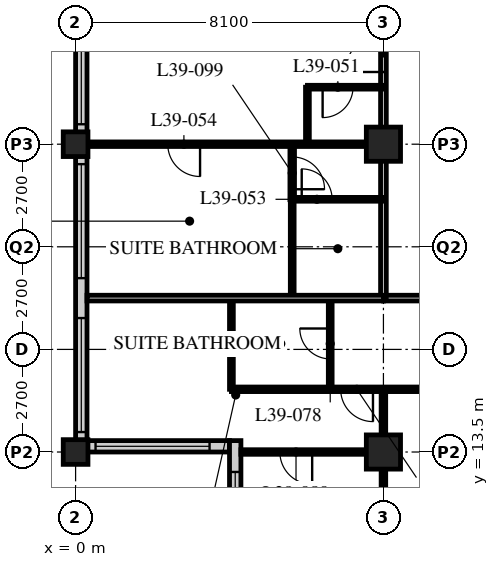
"""IFC4 building model, lengths in metres.
Left out: names, types, materials, properties, quantities, classifications, styles, units other than length and angle.
Written with IfcOpenShell. Run it as: python <this file> out.ifc"""

import sys

from ifc_helpers import new_model, si_unit, direction, frame, frame_2d, origin, origin_2d, place, context, subcontext, project, spatial, rectangle, hollow_rectangle, extrude, element, fill, save


model = new_model("IFC4")
c1 = context("Model", 3, precision=1e-05, world=origin(), true_north=direction((0.0, 1.0)))
c2 = subcontext(c1, "Body", "Model", "MODEL_VIEW")
j1 = project(units=[si_unit("LENGTHUNIT", "METRE"), si_unit("PLANEANGLEUNIT", "RADIAN")], contexts=[c1])
p1 = place(None, origin())
s1 = spatial("IfcSite", under=j1, at=p1, CompositionType="ELEMENT")
p2 = place(p1, origin())
s2 = spatial("IfcBuilding", under=s1, at=p2, CompositionType="ELEMENT")
p3 = place(p2, frame((0.0, 0.0, 151.0)))
s3 = spatial("IfcBuildingStorey", under=s2, at=p3, CompositionType="ELEMENT", Elevation=151.0)
for number, where, z_axis, x_axis in (
    (1, (0.0, 13.5, 0.0), (0.0, 0.0, 1.0), (1.0, 0.0, 0.0)),
    (2, (0.0, 21.6, 0.0), (0.0, 0.0, 1.0), (1.0, 0.0, 0.0)),
):
    element("IfcColumn", number, at=place(p3, frame(where, z_axis=z_axis, x_axis=x_axis)), inside=s3, PredefinedType="COLUMN", context=c2, shape_type="SweptSolid", body=[
        extrude(hollow_rectangle(XDim=0.65, YDim=0.65, WallThickness=0.055, at=origin_2d()), origin(), (0.0, 0.0, 1.0), 3.4),
    ])
for number, where, z_axis, x_axis in (
    (3, (8.1, 13.5, 0.0), (0.0, 0.0, 1.0), (1.0, 0.0, 0.0)),
    (4, (8.1, 21.6, 0.0), (0.0, 0.0, 1.0), (1.0, 0.0, 0.0)),
):
    element("IfcColumn", number, at=place(p3, frame(where, z_axis=z_axis, x_axis=x_axis)), inside=s3, PredefinedType="COLUMN", context=c2, shape_type="SweptSolid", body=[
        extrude(hollow_rectangle(XDim=0.9, YDim=0.9, WallThickness=0.1, at=origin_2d()), origin(), (0.0, 0.0, 1.0), 3.4),
    ])
p4 = place(p3, frame((0.15, 45.6, 0.0), z_axis=(0.0, 0.0, 1.0), x_axis=(0.0, -1.0, 0.0)))
e5 = element("IfcWall", 5, at=p4, inside=s3, PredefinedType="SOLIDWALL", context=c2, shape_type="SweptSolid", body=[
    extrude(rectangle(XDim=32.1, YDim=0.3, at=frame_2d((16.05, 0.0))), origin(), (0.0, 0.0, 1.0), 3.19),
])
p5 = place(p4, frame((0.225, 0.0, 0.9)))
e6 = element("IfcOpeningElement", 6, at=p5, cuts=e5, PredefinedType="OPENING", context=c2, shape_type="SweptSolid", body=[
    extrude(rectangle(XDim=3.0, YDim=1.4, at=frame_2d((1.5, 0.7))), frame((0.0, 0.16, 0.0), z_axis=(0.0, -1.0, 0.0), x_axis=(1.0, 0.0, 0.0)), (0.0, 0.0, 1.0), 0.32),
])
p6 = place(p4, frame((4.275, 0.0, 0.9)))
e7 = element("IfcOpeningElement", 7, at=p6, cuts=e5, PredefinedType="OPENING", context=c2, shape_type="SweptSolid", body=[
    extrude(rectangle(XDim=3.0, YDim=1.4, at=frame_2d((1.5, 0.7))), frame((0.0, 0.16, 0.0), z_axis=(0.0, -1.0, 0.0), x_axis=(1.0, 0.0, 0.0)), (0.0, 0.0, 1.0), 0.32),
])
p7 = place(p4, frame((8.325, 0.0, 0.9)))
e8 = element("IfcOpeningElement", 8, at=p7, cuts=e5, PredefinedType="OPENING", context=c2, shape_type="SweptSolid", body=[
    extrude(rectangle(XDim=3.0, YDim=1.4, at=frame_2d((1.5, 0.7))), frame((0.0, 0.16, 0.0), z_axis=(0.0, -1.0, 0.0), x_axis=(1.0, 0.0, 0.0)), (0.0, 0.0, 1.0), 0.32),
])
p8 = place(p4, frame((12.375, 0.0, 0.9)))
e9 = element("IfcOpeningElement", 9, at=p8, cuts=e5, PredefinedType="OPENING", context=c2, shape_type="SweptSolid", body=[
    extrude(rectangle(XDim=3.0, YDim=1.4, at=frame_2d((1.5, 0.7))), frame((0.0, 0.16, 0.0), z_axis=(0.0, -1.0, 0.0), x_axis=(1.0, 0.0, 0.0)), (0.0, 0.0, 1.0), 0.32),
])
p9 = place(p4, frame((16.425, 0.0, 0.9)))
e10 = element("IfcOpeningElement", 10, at=p9, cuts=e5, PredefinedType="OPENING", context=c2, shape_type="SweptSolid", body=[
    extrude(rectangle(XDim=3.0, YDim=1.4, at=frame_2d((1.5, 0.7))), frame((0.0, 0.16, 0.0), z_axis=(0.0, -1.0, 0.0), x_axis=(1.0, 0.0, 0.0)), (0.0, 0.0, 1.0), 0.32),
])
p10 = place(p4, frame((20.475, 0.0, 0.9)))
e11 = element("IfcOpeningElement", 11, at=p10, cuts=e5, PredefinedType="OPENING", context=c2, shape_type="SweptSolid", body=[
    extrude(rectangle(XDim=3.0, YDim=1.4, at=frame_2d((1.5, 0.7))), frame((0.0, 0.16, 0.0), z_axis=(0.0, -1.0, 0.0), x_axis=(1.0, 0.0, 0.0)), (0.0, 0.0, 1.0), 0.32),
])
p11 = place(p4, frame((24.525, 0.0, 0.9)))
e12 = element("IfcOpeningElement", 12, at=p11, cuts=e5, PredefinedType="OPENING", context=c2, shape_type="SweptSolid", body=[
    extrude(rectangle(XDim=3.0, YDim=1.4, at=frame_2d((1.5, 0.7))), frame((0.0, 0.16, 0.0), z_axis=(0.0, -1.0, 0.0), x_axis=(1.0, 0.0, 0.0)), (0.0, 0.0, 1.0), 0.32),
])
p12 = place(p4, frame((28.575, 0.0, 0.9)))
e13 = element("IfcOpeningElement", 13, at=p12, cuts=e5, PredefinedType="OPENING", context=c2, shape_type="SweptSolid", body=[
    extrude(rectangle(XDim=3.0, YDim=1.4, at=frame_2d((1.5, 0.7))), frame((0.0, 0.16, 0.0), z_axis=(0.0, -1.0, 0.0), x_axis=(1.0, 0.0, 0.0)), (0.0, 0.0, 1.0), 0.32),
])
p13 = place(p3, frame((0.3, 13.65, 0.0), z_axis=(0.0, 0.0, 1.0), x_axis=(1.0, 0.0, 0.0)))
e14 = element("IfcWall", 14, at=p13, inside=s3, PredefinedType="SOLIDWALL", context=c2, shape_type="SweptSolid", body=[
    extrude(rectangle(XDim=3.75, YDim=0.3, at=frame_2d((1.875, 0.0))), origin(), (0.0, 0.0, 1.0), 3.19),
])
p14 = place(p13, frame((0.225, 0.0, 0.9)))
e15 = element("IfcOpeningElement", 15, at=p14, cuts=e14, PredefinedType="OPENING", context=c2, shape_type="SweptSolid", body=[
    extrude(rectangle(XDim=3.0, YDim=1.4, at=frame_2d((1.5, 0.7))), frame((0.0, 0.16, 0.0), z_axis=(0.0, -1.0, 0.0), x_axis=(1.0, 0.0, 0.0)), (0.0, 0.0, 1.0), 0.32),
])
p15 = place(p3, frame((4.2, 13.8, 0.0), z_axis=(0.0, 0.0, 1.0), x_axis=(0.0, -1.0, 0.0)))
e16 = element("IfcWall", 16, at=p15, inside=s3, PredefinedType="SOLIDWALL", context=c2, shape_type="SweptSolid", body=[
    extrude(rectangle(XDim=4.35, YDim=0.3, at=frame_2d((2.175, 0.0))), origin(), (0.0, 0.0, 1.0), 3.19),
])
p16 = place(p15, frame((0.825, 0.0, 0.9)))
e17 = element("IfcOpeningElement", 17, at=p16, cuts=e16, PredefinedType="OPENING", context=c2, shape_type="SweptSolid", body=[
    extrude(rectangle(XDim=3.0, YDim=1.4, at=frame_2d((1.5, 0.7))), frame((0.0, 0.16, 0.0), z_axis=(0.0, -1.0, 0.0), x_axis=(1.0, 0.0, 0.0)), (0.0, 0.0, 1.0), 0.32),
])
p17 = place(p3, frame((8.1, 17.55, 0.0), z_axis=(0.0, 0.0, 1.0), x_axis=(1.0, 0.0, 0.0)))
e18 = element("IfcWall", 18, at=p17, inside=s3, PredefinedType="PARTITIONING", context=c2, shape_type="SweptSolid", body=[
    extrude(rectangle(XDim=40.5, YDim=0.15, at=frame_2d((20.25, 0.0))), origin(), (0.0, 0.0, 1.0), 3.19),
])
p18 = place(p17, frame((10.0, 0.0, 0.0)))
e19 = element("IfcOpeningElement", 19, at=p18, cuts=e18, PredefinedType="OPENING", context=c2, shape_type="SweptSolid", body=[
    extrude(rectangle(XDim=1.0, YDim=2.1, at=frame_2d((0.5, 1.05))), frame((0.0, 0.085, 0.0), z_axis=(0.0, -1.0, 0.0), x_axis=(1.0, 0.0, 0.0)), (0.0, 0.0, 1.0), 0.17),
])
p19 = place(p17, frame((22.15, 0.0, 0.0)))
e20 = element("IfcOpeningElement", 20, at=p19, cuts=e18, PredefinedType="OPENING", context=c2, shape_type="SweptSolid", body=[
    extrude(rectangle(XDim=1.0, YDim=2.1, at=frame_2d((0.5, 1.05))), frame((0.0, 0.085, 0.0), z_axis=(0.0, -1.0, 0.0), x_axis=(1.0, 0.0, 0.0)), (0.0, 0.0, 1.0), 0.17),
])
p20 = place(p17, frame((30.8, 0.0, 0.0)))
e21 = element("IfcOpeningElement", 21, at=p20, cuts=e18, PredefinedType="OPENING", context=c2, shape_type="SweptSolid", body=[
    extrude(rectangle(XDim=1.0, YDim=2.1, at=frame_2d((0.5, 1.05))), frame((0.0, 0.085, 0.0), z_axis=(0.0, -1.0, 0.0), x_axis=(1.0, 0.0, 0.0)), (0.0, 0.0, 1.0), 0.17),
])
p21 = place(p17, frame((34.85, 0.0, 0.0)))
e22 = element("IfcOpeningElement", 22, at=p21, cuts=e18, PredefinedType="OPENING", context=c2, shape_type="SweptSolid", body=[
    extrude(rectangle(XDim=1.0, YDim=2.1, at=frame_2d((0.5, 1.05))), frame((0.0, 0.085, 0.0), z_axis=(0.0, -1.0, 0.0), x_axis=(1.0, 0.0, 0.0)), (0.0, 0.0, 1.0), 0.17),
])
p22 = place(p17, frame((1.525, 0.0, 0.0)))
e23 = element("IfcOpeningElement", 23, at=p22, cuts=e18, PredefinedType="OPENING", context=c2, shape_type="SweptSolid", body=[
    extrude(rectangle(XDim=1.0, YDim=2.1, at=frame_2d((0.5, 1.05))), frame((0.0, 0.085, 0.0), z_axis=(0.0, -1.0, 0.0), x_axis=(1.0, 0.0, 0.0)), (0.0, 0.0, 1.0), 0.17),
])
p23 = place(p17, frame((37.975, 0.0, 0.0)))
e24 = element("IfcOpeningElement", 24, at=p23, cuts=e18, PredefinedType="OPENING", context=c2, shape_type="SweptSolid", body=[
    extrude(rectangle(XDim=1.0, YDim=2.1, at=frame_2d((0.5, 1.05))), frame((0.0, 0.085, 0.0), z_axis=(0.0, -1.0, 0.0), x_axis=(1.0, 0.0, 0.0)), (0.0, 0.0, 1.0), 0.17),
])
p24 = place(p3, frame((8.1, 17.55, 0.0), z_axis=(0.0, 0.0, 1.0), x_axis=(0.0, 1.0, 0.0)))
e25 = element("IfcWall", 25, at=p24, inside=s3, PredefinedType="PARTITIONING", context=c2, shape_type="SweptSolid", body=[
    extrude(rectangle(XDim=28.35, YDim=0.15, at=frame_2d((14.175, 0.0))), origin(), (0.0, 0.0, 1.0), 2.42),
])
p25 = place(p24, frame((5.95, 0.0, 0.0)))
e26 = element("IfcOpeningElement", 26, at=p25, cuts=e25, PredefinedType="OPENING", context=c2, shape_type="SweptSolid", body=[
    extrude(rectangle(XDim=1.0, YDim=2.1, at=frame_2d((0.5, 1.05))), frame((0.0, 0.085, 0.0), z_axis=(0.0, -1.0, 0.0), x_axis=(1.0, 0.0, 0.0)), (0.0, 0.0, 1.0), 0.17),
])
p26 = place(p24, frame((16.8, 0.0, 0.0)))
e27 = element("IfcOpeningElement", 27, at=p26, cuts=e25, PredefinedType="OPENING", context=c2, shape_type="SweptSolid", body=[
    extrude(rectangle(XDim=1.0, YDim=2.1, at=frame_2d((0.5, 1.05))), frame((0.0, 0.085, 0.0), z_axis=(0.0, -1.0, 0.0), x_axis=(1.0, 0.0, 0.0)), (0.0, 0.0, 1.0), 0.17),
])
p27 = place(p24, frame((22.7, 0.0, 0.0)))
e28 = element("IfcOpeningElement", 28, at=p27, cuts=e25, PredefinedType="OPENING", context=c2, shape_type="SweptSolid", body=[
    extrude(rectangle(XDim=1.0, YDim=2.1, at=frame_2d((0.5, 1.05))), frame((0.0, 0.085, 0.0), z_axis=(0.0, -1.0, 0.0), x_axis=(1.0, 0.0, 0.0)), (0.0, 0.0, 1.0), 0.17),
])
p28 = place(p24, frame((24.9, 0.0, 0.0)))
e29 = element("IfcOpeningElement", 29, at=p28, cuts=e25, PredefinedType="OPENING", context=c2, shape_type="SweptSolid", body=[
    extrude(rectangle(XDim=1.0, YDim=2.1, at=frame_2d((0.5, 1.05))), frame((0.0, 0.085, 0.0), z_axis=(0.0, -1.0, 0.0), x_axis=(1.0, 0.0, 0.0)), (0.0, 0.0, 1.0), 0.17),
])
p29 = place(p3, frame((6.1, 21.6, 0.0), z_axis=(0.0, 0.0, 1.0), x_axis=(0.0, 1.0, 0.0)))
e30 = element("IfcWall", 30, at=p29, inside=s3, PredefinedType="PARTITIONING", context=c2, shape_type="SweptSolid", body=[
    extrude(rectangle(XDim=1.5, YDim=0.1, at=frame_2d((0.75, 0.0))), origin(), (0.0, 0.0, 1.0), 3.19),
])
p30 = place(p3, frame((8.1, 23.1, 0.0), z_axis=(0.0, 0.0, 1.0), x_axis=(-1.0, 0.0, 0.0)))
e31 = element("IfcWall", 31, at=p30, inside=s3, PredefinedType="PARTITIONING", context=c2, shape_type="SweptSolid", body=[
    extrude(rectangle(XDim=2.0, YDim=0.1, at=frame_2d((1.0, 0.0))), origin(), (0.0, 0.0, 1.0), 3.19),
])
p31 = place(p30, frame((0.8, 0.0, 0.0)))
e32 = element("IfcOpeningElement", 32, at=p31, cuts=e31, PredefinedType="OPENING", context=c2, shape_type="SweptSolid", body=[
    extrude(rectangle(XDim=0.8, YDim=2.1, at=frame_2d((0.4, 1.05))), frame((0.0, 0.06, 0.0), z_axis=(0.0, -1.0, 0.0), x_axis=(1.0, 0.0, 0.0)), (0.0, 0.0, 1.0), 0.12),
])
p32 = place(p3, frame((5.7, 17.55, 0.0), z_axis=(0.0, 0.0, 1.0), x_axis=(0.0, 1.0, 0.0)))
e33 = element("IfcWall", 33, at=p32, inside=s3, PredefinedType="PARTITIONING", context=c2, shape_type="SweptSolid", body=[
    extrude(rectangle(XDim=2.6, YDim=0.1, at=frame_2d((1.3, 0.0))), origin(), (0.0, 0.0, 1.0), 3.19),
])
p33 = place(p3, frame((8.1, 20.15, 0.0), z_axis=(0.0, 0.0, 1.0), x_axis=(-1.0, 0.0, 0.0)))
e34 = element("IfcWall", 34, at=p33, inside=s3, PredefinedType="PARTITIONING", context=c2, shape_type="SweptSolid", body=[
    extrude(rectangle(XDim=2.4, YDim=0.1, at=frame_2d((1.2, 0.0))), origin(), (0.0, 0.0, 1.0), 3.19),
])
p34 = place(p33, frame((1.35, 0.0, 0.0)))
e35 = element("IfcOpeningElement", 35, at=p34, cuts=e34, PredefinedType="OPENING", context=c2, shape_type="SweptSolid", body=[
    extrude(rectangle(XDim=0.8, YDim=2.1, at=frame_2d((0.4, 1.05))), frame((0.0, 0.06, 0.0), z_axis=(0.0, -1.0, 0.0), x_axis=(1.0, 0.0, 0.0)), (0.0, 0.0, 1.0), 0.12),
])
p35 = place(p3, frame((8.1, 21.6, 0.0), z_axis=(0.0, 0.0, 1.0), x_axis=(-1.0, 0.0, 0.0)))
e36 = element("IfcWall", 36, at=p35, inside=s3, PredefinedType="PARTITIONING", context=c2, shape_type="SweptSolid", body=[
    extrude(rectangle(XDim=7.8, YDim=0.12, at=frame_2d((3.9, 0.0))), origin(), (0.0, 0.0, 1.0), 2.42),
])
p36 = place(p35, frame((4.825, 0.0, 0.0)))
e37 = element("IfcOpeningElement", 37, at=p36, cuts=e36, PredefinedType="OPENING", context=c2, shape_type="SweptSolid", body=[
    extrude(rectangle(XDim=0.85, YDim=2.1, at=frame_2d((0.425, 1.05))), frame((0.0, 0.07, 0.0), z_axis=(0.0, -1.0, 0.0), x_axis=(1.0, 0.0, 0.0)), (0.0, 0.0, 1.0), 0.14),
])
p37 = place(p3, frame((6.7, 17.55, 0.0), z_axis=(0.0, 0.0, 1.0), x_axis=(0.0, -1.0, 0.0)))
e38 = element("IfcWall", 38, at=p37, inside=s3, PredefinedType="PARTITIONING", context=c2, shape_type="SweptSolid", body=[
    extrude(rectangle(XDim=2.4, YDim=0.1, at=frame_2d((1.2, 0.0))), origin(), (0.0, 0.0, 1.0), 3.19),
])
p38 = place(p37, frame((0.8, 0.0, 0.0)))
e39 = element("IfcOpeningElement", 39, at=p38, cuts=e38, PredefinedType="OPENING", context=c2, shape_type="SweptSolid", body=[
    extrude(rectangle(XDim=0.8, YDim=2.1, at=frame_2d((0.4, 1.05))), frame((0.0, 0.06, 0.0), z_axis=(0.0, -1.0, 0.0), x_axis=(1.0, 0.0, 0.0)), (0.0, 0.0, 1.0), 0.12),
])
p39 = place(p3, frame((4.1, 17.55, 0.0), z_axis=(0.0, 0.0, 1.0), x_axis=(0.0, -1.0, 0.0)))
e40 = element("IfcWall", 40, at=p39, inside=s3, PredefinedType="PARTITIONING", context=c2, shape_type="SweptSolid", body=[
    extrude(rectangle(XDim=2.4, YDim=0.1, at=frame_2d((1.2, 0.0))), origin(), (0.0, 0.0, 1.0), 3.19),
])
p40 = place(p3, frame((4.1, 15.15, 0.0), z_axis=(0.0, 0.0, 1.0), x_axis=(1.0, 0.0, 0.0)))
e41 = element("IfcWall", 41, at=p40, inside=s3, PredefinedType="PARTITIONING", context=c2, shape_type="SweptSolid", body=[
    extrude(rectangle(XDim=8.05, YDim=0.12, at=frame_2d((4.025, 0.0))), origin(), (0.0, 0.0, 1.0), 3.19),
])
p41 = place(p40, frame((6.725, 0.0, 0.0)))
e42 = element("IfcOpeningElement", 42, at=p41, cuts=e41, PredefinedType="OPENING", context=c2, shape_type="SweptSolid", body=[
    extrude(rectangle(XDim=0.85, YDim=2.1, at=frame_2d((0.425, 1.05))), frame((0.0, 0.07, 0.0), z_axis=(0.0, -1.0, 0.0), x_axis=(1.0, 0.0, 0.0)), (0.0, 0.0, 1.0), 0.14),
])
p42 = place(p40, frame((2.875, 0.0, 0.0)))
e43 = element("IfcOpeningElement", 43, at=p42, cuts=e41, PredefinedType="OPENING", context=c2, shape_type="SweptSolid", body=[
    extrude(rectangle(XDim=0.85, YDim=2.1, at=frame_2d((0.425, 1.05))), frame((0.0, 0.07, 0.0), z_axis=(0.0, -1.0, 0.0), x_axis=(1.0, 0.0, 0.0)), (0.0, 0.0, 1.0), 0.14),
])
p43 = place(p3, frame((8.1, 15.15, 0.0), z_axis=(0.0, 0.0, 1.0), x_axis=(0.0, -1.0, 0.0)))
e44 = element("IfcWall", 44, at=p43, inside=s3, PredefinedType="PARTITIONING", context=c2, shape_type="SweptSolid", body=[
    extrude(rectangle(XDim=5.4, YDim=0.12, at=frame_2d((2.7, 0.0))), origin(), (0.0, 0.0, 1.0), 2.42),
])
p44 = place(p3, frame((8.1, 13.5, 0.0), z_axis=(0.0, 0.0, 1.0), x_axis=(-1.0, 0.0, 0.0)))
e45 = element("IfcWall", 45, at=p44, inside=s3, PredefinedType="PARTITIONING", context=c2, shape_type="SweptSolid", body=[
    extrude(rectangle(XDim=3.75, YDim=0.12, at=frame_2d((1.875, 0.0))), origin(), (0.0, 0.0, 1.0), 2.42),
])
p45 = place(p44, frame((1.875, 0.0, 0.0)))
e46 = element("IfcOpeningElement", 46, at=p45, cuts=e45, PredefinedType="OPENING", context=c2, shape_type="SweptSolid", body=[
    extrude(rectangle(XDim=0.85, YDim=2.1, at=frame_2d((0.425, 1.05))), frame((0.0, 0.07, 0.0), z_axis=(0.0, -1.0, 0.0), x_axis=(1.0, 0.0, 0.0)), (0.0, 0.0, 1.0), 0.14),
])
p46 = place(p3, frame((0.3, 17.55, 0.0), z_axis=(0.0, 0.0, 1.0), x_axis=(1.0, 0.0, 0.0)))
e47 = element("IfcWall", 47, at=p46, inside=s3, PredefinedType="PARTITIONING", context=c2, shape_type="SweptSolid", body=[
    extrude(rectangle(XDim=7.8, YDim=0.15, at=frame_2d((3.9, 0.0))), origin(), (0.0, 0.0, 1.0), 3.19),
])
p47 = place(p3, frame((5.7, 20.14, 0.0), z_axis=(0.0, 0.0, 1.0), x_axis=(0.0, 1.0, 0.0)))
e48 = element("IfcWall", 48, at=p47, inside=s3, PredefinedType="PARTITIONING", context=c2, shape_type="SweptSolid", body=[
    extrude(rectangle(XDim=1.46, YDim=0.12, at=frame_2d((0.73, 0.0))), origin(), (0.0, 0.0, 1.0), 3.19),
])
p48 = place(p47, frame((0.275, 0.0, 0.0)))
e49 = element("IfcOpeningElement", 49, at=p48, cuts=e48, PredefinedType="OPENING", context=c2, shape_type="SweptSolid", body=[
    extrude(rectangle(XDim=0.85, YDim=2.1, at=frame_2d((0.425, 1.05))), frame((0.0, 0.07, 0.0), z_axis=(0.0, -1.0, 0.0), x_axis=(1.0, 0.0, 0.0)), (0.0, 0.0, 1.0), 0.14),
])
p49 = place(p10, origin())
e50 = element("IfcWindow", 50, at=p49, inside=s3, PartitioningType="SINGLE_PANEL", PredefinedType="WINDOW", context=c2, shape_type="SweptSolid", body=[
    extrude(rectangle(XDim=3.0, YDim=1.4, at=frame_2d((1.5, 0.7))), frame((0.0, 0.03, 0.0), z_axis=(0.0, -1.0, 0.0), x_axis=(1.0, 0.0, 0.0)), (0.0, 0.0, 1.0), 0.06),
])
fill(e11, e50)
p50 = place(p11, origin())
e51 = element("IfcWindow", 51, at=p50, inside=s3, PartitioningType="SINGLE_PANEL", PredefinedType="WINDOW", context=c2, shape_type="SweptSolid", body=[
    extrude(rectangle(XDim=3.0, YDim=1.4, at=frame_2d((1.5, 0.7))), frame((0.0, 0.03, 0.0), z_axis=(0.0, -1.0, 0.0), x_axis=(1.0, 0.0, 0.0)), (0.0, 0.0, 1.0), 0.06),
])
fill(e12, e51)
p51 = place(p12, origin())
e52 = element("IfcWindow", 52, at=p51, inside=s3, PartitioningType="SINGLE_PANEL", PredefinedType="WINDOW", context=c2, shape_type="SweptSolid", body=[
    extrude(rectangle(XDim=3.0, YDim=1.4, at=frame_2d((1.5, 0.7))), frame((0.0, 0.03, 0.0), z_axis=(0.0, -1.0, 0.0), x_axis=(1.0, 0.0, 0.0)), (0.0, 0.0, 1.0), 0.06),
])
fill(e13, e52)
p52 = place(p14, origin())
e53 = element("IfcWindow", 53, at=p52, inside=s3, PartitioningType="SINGLE_PANEL", PredefinedType="WINDOW", context=c2, shape_type="SweptSolid", body=[
    extrude(rectangle(XDim=3.0, YDim=1.4, at=frame_2d((1.5, 0.7))), frame((0.0, 0.03, 0.0), z_axis=(0.0, -1.0, 0.0), x_axis=(1.0, 0.0, 0.0)), (0.0, 0.0, 1.0), 0.06),
])
fill(e15, e53)
p53 = place(p16, origin())
e54 = element("IfcWindow", 54, at=p53, inside=s3, PartitioningType="SINGLE_PANEL", PredefinedType="WINDOW", context=c2, shape_type="SweptSolid", body=[
    extrude(rectangle(XDim=3.0, YDim=1.4, at=frame_2d((1.5, 0.7))), frame((0.0, 0.03, 0.0), z_axis=(0.0, -1.0, 0.0), x_axis=(1.0, 0.0, 0.0)), (0.0, 0.0, 1.0), 0.06),
])
fill(e17, e54)
p54 = place(p31, origin())
e55 = element("IfcDoor", 55, at=p54, inside=s3, OperationType="SINGLE_SWING_RIGHT", PredefinedType="DOOR", context=c2, shape_type="SweptSolid", body=[
    extrude(rectangle(XDim=0.8, YDim=2.1, at=frame_2d((0.4, 1.05))), frame((0.0, 0.025, 0.0), z_axis=(0.0, -1.0, 0.0), x_axis=(1.0, 0.0, 0.0)), (0.0, 0.0, 1.0), 0.05),
])
fill(e32, e55)
p55 = place(p25, origin())
e56 = element("IfcDoor", 56, at=p55, inside=s3, OperationType="SINGLE_SWING_LEFT", PredefinedType="DOOR", context=c2, shape_type="SweptSolid", body=[
    extrude(rectangle(XDim=1.0, YDim=2.1, at=frame_2d((0.5, 1.05))), frame((0.0, 0.025, 0.0), z_axis=(0.0, -1.0, 0.0), x_axis=(1.0, 0.0, 0.0)), (0.0, 0.0, 1.0), 0.05),
])
fill(e26, e56)
p56 = place(p34, origin())
e57 = element("IfcDoor", 57, at=p56, inside=s3, OperationType="SINGLE_SWING_LEFT", PredefinedType="DOOR", context=c2, shape_type="SweptSolid", body=[
    extrude(rectangle(XDim=0.8, YDim=2.1, at=frame_2d((0.4, 1.05))), frame((0.0, 0.025, 0.0), z_axis=(0.0, -1.0, 0.0), x_axis=(1.0, 0.0, 0.0)), (0.0, 0.0, 1.0), 0.05),
])
fill(e35, e57)
p57 = place(p36, origin())
e58 = element("IfcDoor", 58, at=p57, inside=s3, OperationType="SINGLE_SWING_LEFT", PredefinedType="DOOR", context=c2, shape_type="SweptSolid", body=[
    extrude(rectangle(XDim=0.85, YDim=2.1, at=frame_2d((0.425, 1.05))), frame((0.0, 0.025, 0.0), z_axis=(0.0, -1.0, 0.0), x_axis=(1.0, 0.0, 0.0)), (0.0, 0.0, 1.0), 0.05),
])
fill(e37, e58)
p58 = place(p38, origin())
e59 = element("IfcDoor", 59, at=p58, inside=s3, OperationType="SINGLE_SWING_RIGHT", PredefinedType="DOOR", context=c2, shape_type="SweptSolid", body=[
    extrude(rectangle(XDim=0.8, YDim=2.1, at=frame_2d((0.4, 1.05))), frame((0.0, 0.025, 0.0), z_axis=(0.0, -1.0, 0.0), x_axis=(1.0, 0.0, 0.0)), (0.0, 0.0, 1.0), 0.05),
])
fill(e39, e59)
p59 = place(p42, origin())
e60 = element("IfcDoor", 60, at=p59, inside=s3, OperationType="SINGLE_SWING_LEFT", PredefinedType="DOOR", context=c2, shape_type="SweptSolid", body=[
    extrude(rectangle(XDim=0.85, YDim=2.1, at=frame_2d((0.425, 1.05))), frame((0.0, 0.025, 0.0), z_axis=(0.0, -1.0, 0.0), x_axis=(1.0, 0.0, 0.0)), (0.0, 0.0, 1.0), 0.05),
])
fill(e43, e60)
p60 = place(p45, origin())
e61 = element("IfcDoor", 61, at=p60, inside=s3, OperationType="SINGLE_SWING_LEFT", PredefinedType="DOOR", context=c2, shape_type="SweptSolid", body=[
    extrude(rectangle(XDim=0.85, YDim=2.1, at=frame_2d((0.425, 1.05))), frame((0.0, 0.025, 0.0), z_axis=(0.0, -1.0, 0.0), x_axis=(1.0, 0.0, 0.0)), (0.0, 0.0, 1.0), 0.05),
])
fill(e46, e61)
p61 = place(p48, origin())
e62 = element("IfcDoor", 62, at=p61, inside=s3, OperationType="SINGLE_SWING_RIGHT", PredefinedType="DOOR", context=c2, shape_type="SweptSolid", body=[
    extrude(rectangle(XDim=0.85, YDim=2.1, at=frame_2d((0.425, 1.05))), frame((0.0, 0.025, 0.0), z_axis=(0.0, -1.0, 0.0), x_axis=(1.0, 0.0, 0.0)), (0.0, 0.0, 1.0), 0.05),
])
fill(e49, e62)
save(model, sys.argv[1])
